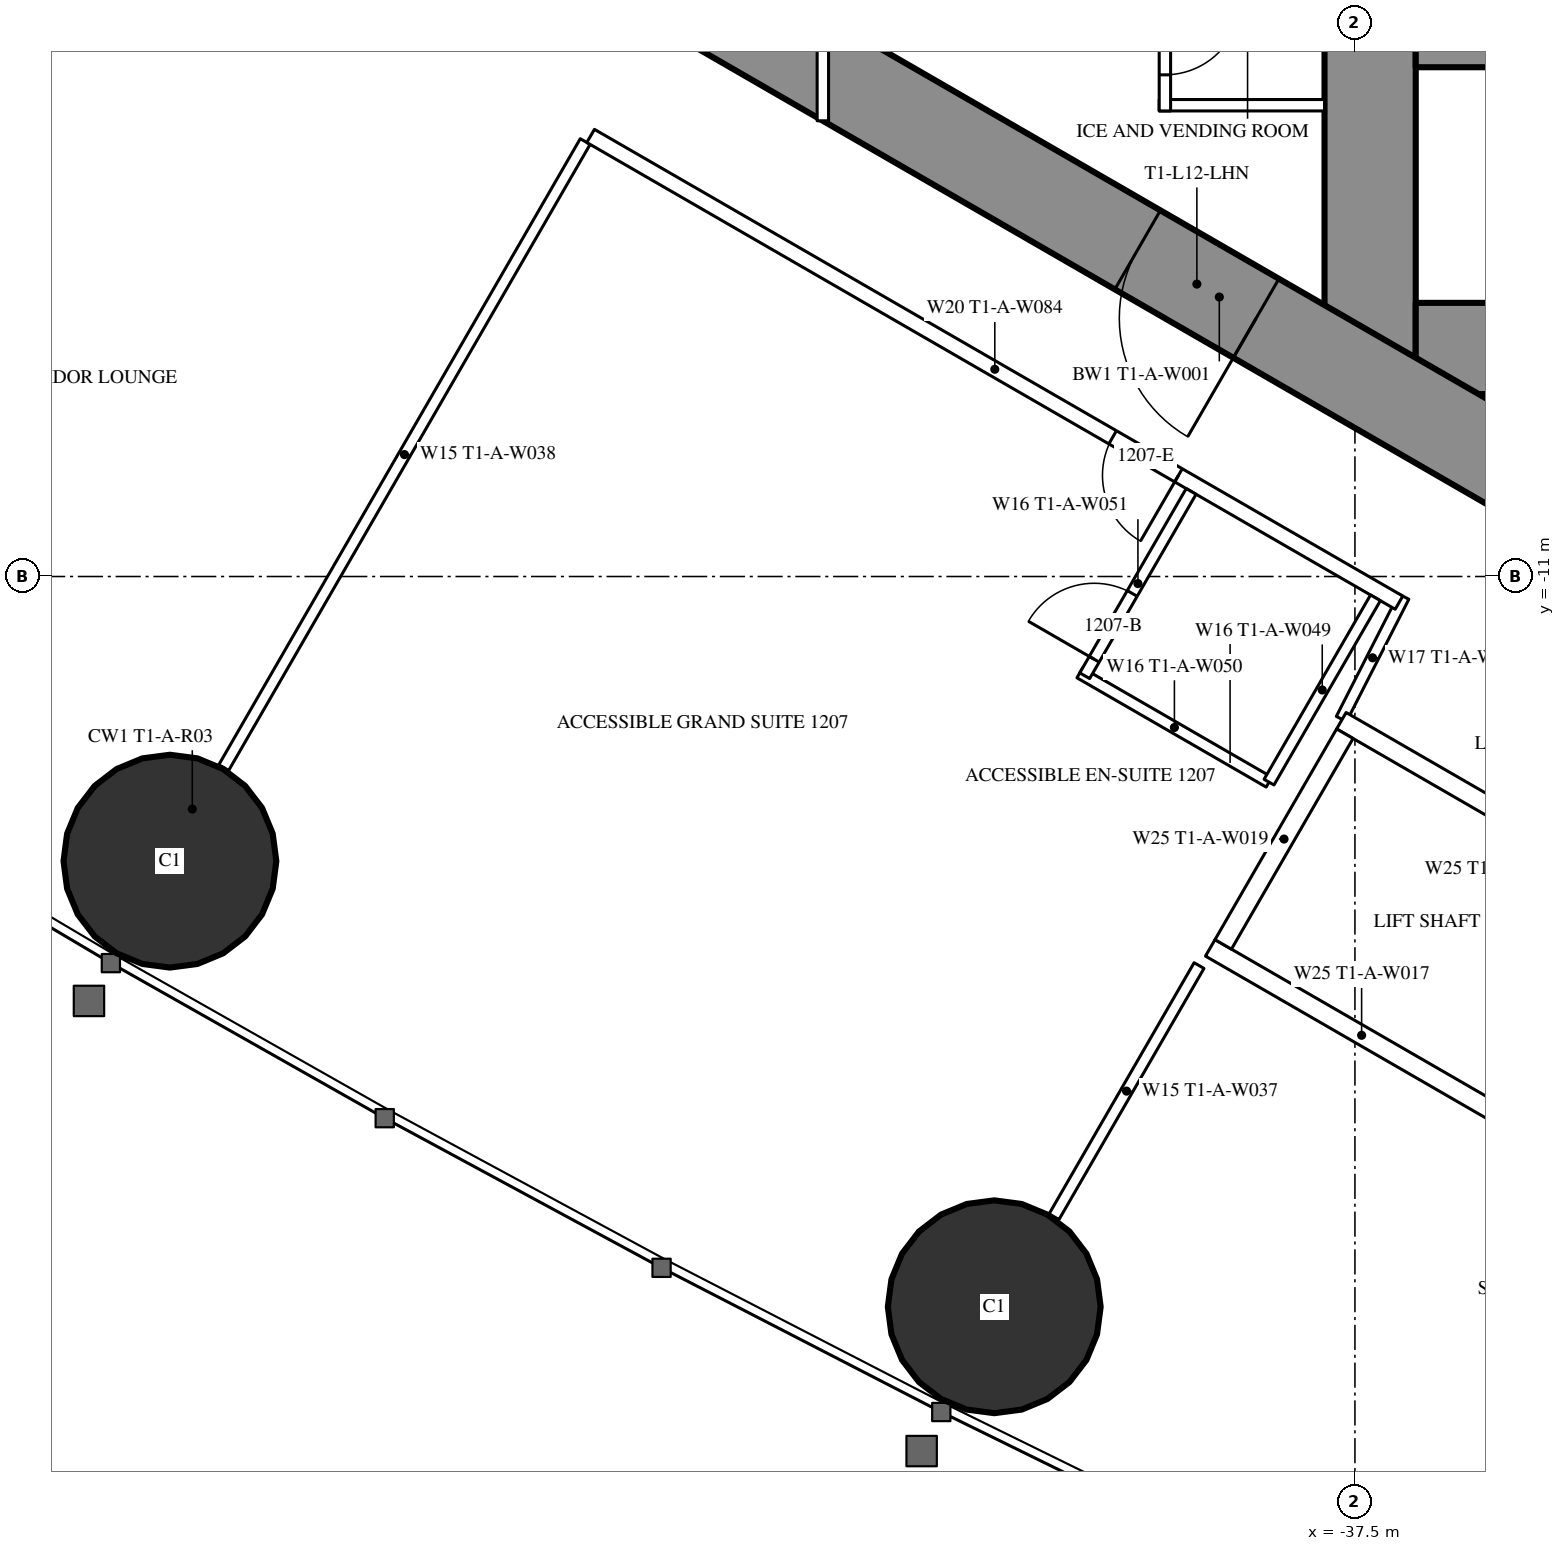
"""IFC4 building model, lengths in metres.
Left out: names, types, materials, properties, quantities, classifications, styles, units other than length and angle.
Written with IfcOpenShell. Run it as: python <this file> out.ifc"""

import sys

from ifc_helpers import new_model, si_unit, direction, frame, frame_2d, origin, origin_2d, place, context, subcontext, project, spatial, rectangle, hollow_circle, extrude, element, fill, save


model = new_model("IFC4")
c1 = context("Model", 3, precision=1e-05, world=origin(), true_north=direction((0.0, 1.0)))
c2 = subcontext(c1, "Body", "Model", "MODEL_VIEW")
j1 = project(units=[si_unit("LENGTHUNIT", "METRE"), si_unit("PLANEANGLEUNIT", "RADIAN")], contexts=[c1])
p1 = place(None, origin())
s1 = spatial("IfcSite", under=j1, at=p1, CompositionType="ELEMENT")
p2 = place(p1, origin())
s2 = spatial("IfcBuilding", under=s1, at=p2, CompositionType="ELEMENT")
p3 = place(p2, frame((0.0, 0.0, 49.5)))
s3 = spatial("IfcBuildingStorey", under=s2, at=p3, CompositionType="ELEMENT", Elevation=49.5)
for number, where, z_axis, x_axis in (
    (1, (-53.09, -14.745, 0.0), (0.0, 0.0, 1.0), (1.0, 0.0, 0.0)),
    (2, (-42.245, -20.607, 0.0), (0.0, 0.0, 1.0), (1.0, 0.0, 0.0)),
):
    element("IfcColumn", number, at=place(p3, frame(where, z_axis=z_axis, x_axis=x_axis)), inside=s3, PredefinedType="COLUMN", context=c2, shape_type="SweptSolid", body=[
        extrude(hollow_circle(Radius=1.4, WallThickness=0.12, at=origin_2d()), origin(), (0.0, 0.0, 1.0), 3.5),
    ])
p4 = place(p3, frame((-37.3, 8.6, 0.0), z_axis=(0.0, 0.0, 1.0), x_axis=(0.0, -1.0, 0.0)))
e3 = element("IfcWall", 3, at=p4, inside=s3, PredefinedType="SHEAR", context=c2, shape_type="SweptSolid", body=[
    extrude(rectangle(XDim=17.2, YDim=1.2, at=frame_2d((8.6, 0.0))), origin(), (0.0, 0.0, 1.0), 3.5),
])
p5 = place(p4, frame((7.7, 0.0, 0.0)))
e4 = element("IfcOpeningElement", 4, at=p5, cuts=e3, PredefinedType="OPENING", context=c2, shape_type="SweptSolid", body=[
    extrude(rectangle(XDim=1.8, YDim=2.2, at=frame_2d((0.9, 1.1))), frame((0.0, 0.61, 0.0), z_axis=(0.0, -1.0, 0.0), x_axis=(1.0, 0.0, 0.0)), (0.0, 0.0, 1.0), 1.22),
])
p6 = place(p3, frame((-28.3, -8.0, 0.0), z_axis=(0.0, 0.0, 1.0), x_axis=(-1.0, 0.0, 0.0)))
e5 = element("IfcWall", 5, at=p6, inside=s3, PredefinedType="SHEAR", context=c2, shape_type="SweptSolid", body=[
    extrude(rectangle(XDim=8.4, YDim=1.2, at=frame_2d((4.2, 0.0))), origin(), (0.0, 0.0, 1.0), 3.5),
])
p7 = place(p6, frame((0.25, 0.0, 0.0)))
e6 = element("IfcOpeningElement", 6, at=p7, cuts=e5, PredefinedType="OPENING", context=c2, shape_type="SweptSolid", body=[
    extrude(rectangle(XDim=1.0, YDim=2.2, at=frame_2d((0.5, 1.1))), frame((0.0, 0.61, 0.0), z_axis=(0.0, -1.0, 0.0), x_axis=(1.0, 0.0, 0.0)), (0.0, 0.0, 1.0), 1.22),
])
p8 = place(p3, frame((-28.3, -4.15, 0.0), z_axis=(0.0, 0.0, 1.0), x_axis=(-1.0, 0.0, 0.0)))
e7 = element("IfcWall", 7, at=p8, inside=s3, PredefinedType="SHEAR", context=c2, shape_type="SweptSolid", body=[
    extrude(rectangle(XDim=8.4, YDim=0.3, at=frame_2d((4.2, 0.0))), origin(), (0.0, 0.0, 1.0), 3.5),
])
p9 = place(p3, frame((-27.2, -14.3, 0.0), z_axis=(0.0, 0.0, 1.0), x_axis=(-0.866024021859, 0.500002393557, 0.0)))
e8 = element("IfcWall", 8, at=p9, inside=s3, PredefinedType="SHEAR", context=c2, shape_type="SweptSolid", body=[
    extrude(rectangle(XDim=27.907, YDim=1.2, at=frame_2d((13.954, 0.0))), origin(), (0.0, 0.0, 1.0), 3.5),
])
p10 = place(p9, frame((4.6, 0.0, 0.0)))
e9 = element("IfcOpeningElement", 9, at=p10, cuts=e8, PredefinedType="OPENING", context=c2, shape_type="SweptSolid", body=[
    extrude(rectangle(XDim=1.0, YDim=2.2, at=frame_2d((0.5, 1.1))), frame((0.0, 0.61, 0.0), z_axis=(0.0, -1.0, 0.0), x_axis=(1.0, 0.0, 0.0)), (0.0, 0.0, 1.0), 1.22),
])
p11 = place(p9, frame((13.395, 0.0, 0.0)))
e10 = element("IfcOpeningElement", 10, at=p11, cuts=e8, PredefinedType="OPENING", context=c2, shape_type="SweptSolid", body=[
    extrude(rectangle(XDim=1.8, YDim=2.2, at=frame_2d((0.9, 1.1))), frame((0.0, 0.61, 0.0), z_axis=(0.0, -1.0, 0.0), x_axis=(1.0, 0.0, 0.0)), (0.0, 0.0, 1.0), 1.22),
])
p12 = place(p3, frame((-47.627, -5.278, 0.0), z_axis=(0.0, 0.0, 1.0), x_axis=(-0.500009844318, -0.86601972009, 0.0)))
e11 = element("IfcWall", 11, at=p12, inside=s3, PredefinedType="PARTITIONING", context=c2, shape_type="SweptSolid", body=[
    extrude(rectangle(XDim=9.51, YDim=0.15, at=frame_2d((4.755, 0.0))), origin(), (0.0, 0.0, 1.0), 2.25),
])
p13 = place(p3, frame((-39.551, -16.118, 0.0), z_axis=(0.0, 0.0, 1.0), x_axis=(-0.499986503906, -0.866033195618, 0.0)))
e12 = element("IfcWall", 12, at=p13, inside=s3, PredefinedType="PARTITIONING", context=c2, shape_type="SweptSolid", body=[
    extrude(rectangle(XDim=3.815, YDim=0.15, at=frame_2d((1.907, 0.0))), origin(), (0.0, 0.0, 1.0), 3.25),
])
p14 = place(p3, frame((-36.857, -11.265, 0.0), z_axis=(0.0, 0.0, 1.0), x_axis=(-0.454225294761, -0.890886851176, 0.0)))
e13 = element("IfcWall", 13, at=p14, inside=s3, PredefinedType="PARTITIONING", context=c2, shape_type="SweptSolid", body=[
    extrude(rectangle(XDim=1.807, YDim=0.15, at=frame_2d((0.904, 0.0))), origin(), (0.0, 0.0, 1.0), 3.25),
])
p15 = place(p3, frame((-36.92, -11.344, 0.0), z_axis=(0.0, 0.0, 1.0), x_axis=(-0.866025017052, 0.500000669839, 0.0)))
e14 = element("IfcWall", 14, at=p15, inside=s3, PredefinedType="PARTITIONING", context=c2, shape_type="SweptSolid", body=[
    extrude(rectangle(XDim=12.28, YDim=0.2, at=frame_2d((6.14, 0.0))), origin(), (0.0, 0.0, 1.0), 3.25),
])
p16 = place(p15, frame((3.35, 0.0, 0.0)))
e15 = element("IfcOpeningElement", 15, at=p16, cuts=e14, PredefinedType="OPENING", context=c2, shape_type="SweptSolid", body=[
    extrude(rectangle(XDim=1.0, YDim=2.2, at=frame_2d((0.5, 1.1))), frame((0.0, 0.11, 0.0), z_axis=(0.0, -1.0, 0.0), x_axis=(1.0, 0.0, 0.0)), (0.0, 0.0, 1.0), 0.22),
])
p17 = place(p3, frame((-38.63, -13.705, 0.0), z_axis=(0.0, 0.0, 1.0), x_axis=(-0.866018712932, 0.500011588718, 0.0)))
e16 = element("IfcWall", 16, at=p17, inside=s3, PredefinedType="PARTITIONING", context=c2, shape_type="SweptSolid", body=[
    extrude(rectangle(XDim=2.875, YDim=0.15, at=frame_2d((1.438, 0.0))), origin(), (0.0, 0.0, 1.0), 3.25),
])
p18 = place(p3, frame((-39.655, -9.88, 0.0), z_axis=(0.0, 0.0, 1.0), x_axis=(-0.500049511043, -0.865996816683, 0.0)))
e17 = element("IfcWall", 17, at=p18, inside=s3, PredefinedType="PARTITIONING", context=c2, shape_type="SweptSolid", body=[
    extrude(rectangle(XDim=2.8, YDim=0.15, at=frame_2d((1.4, 0.0))), origin(), (0.0, 0.0, 1.0), 3.25),
])
p19 = place(p18, frame((1.55, 0.0, 0.0)))
e18 = element("IfcOpeningElement", 18, at=p19, cuts=e17, PredefinedType="OPENING", context=c2, shape_type="SweptSolid", body=[
    extrude(rectangle(XDim=1.0, YDim=2.2, at=frame_2d((0.5, 1.1))), frame((0.0, 0.085, 0.0), z_axis=(0.0, -1.0, 0.0), x_axis=(1.0, 0.0, 0.0)), (0.0, 0.0, 1.0), 0.17),
])
p20 = place(p3, frame((-37.23, -11.281, 0.0), z_axis=(0.0, 0.0, 1.0), x_axis=(-0.500049511043, -0.865996816683, 0.0)))
e19 = element("IfcWall", 19, at=p20, inside=s3, PredefinedType="PARTITIONING", context=c2, shape_type="SweptSolid", body=[
    extrude(rectangle(XDim=2.8, YDim=0.15, at=frame_2d((1.4, 0.0))), origin(), (0.0, 0.0, 1.0), 3.25),
])
p21 = place(p3, frame((-37.9, -4.8, 0.0), z_axis=(0.0, 0.0, 1.0), x_axis=(-1.0, 0.0, 0.0)))
e20 = element("IfcWall", 20, at=p21, inside=s3, PredefinedType="PARTITIONING", context=c2, shape_type="SweptSolid", body=[
    extrude(rectangle(XDim=2.175, YDim=0.15, at=frame_2d((1.087, 0.0))), origin(), (0.0, 0.0, 1.0), 3.25),
])
p22 = place(p3, frame((-40.0, -2.925, 0.0), z_axis=(0.0, 0.0, 1.0), x_axis=(0.0, -1.0, 0.0)))
e21 = element("IfcWall", 21, at=p22, inside=s3, PredefinedType="PARTITIONING", context=c2, shape_type="SweptSolid", body=[
    extrude(rectangle(XDim=1.95, YDim=0.15, at=frame_2d((0.975, 0.0))), origin(), (0.0, 0.0, 1.0), 3.25),
])
p23 = place(p22, frame((0.475, 0.0, 0.0)))
e22 = element("IfcOpeningElement", 22, at=p23, cuts=e21, PredefinedType="OPENING", context=c2, shape_type="SweptSolid", body=[
    extrude(rectangle(XDim=1.0, YDim=2.2, at=frame_2d((0.5, 1.1))), frame((0.0, 0.085, 0.0), z_axis=(0.0, -1.0, 0.0), x_axis=(1.0, 0.0, 0.0)), (0.0, 0.0, 1.0), 0.17),
])
p24 = place(p3, frame((-44.5, 5.005, 0.0), z_axis=(0.0, 0.0, 1.0), x_axis=(0.0, -1.0, 0.0)))
e23 = element("IfcWall", 23, at=p24, inside=s3, PredefinedType="PARTITIONING", context=c2, shape_type="SweptSolid", body=[
    extrude(rectangle(XDim=10.009, YDim=0.15, at=frame_2d((5.005, 0.0))), origin(), (0.0, 0.0, 1.0), 2.45),
])
p25 = place(p24, frame((2.002, 0.0, 0.0)))
e24 = element("IfcOpeningElement", 24, at=p25, cuts=e23, PredefinedType="OPENING", context=c2, shape_type="SweptSolid", body=[
    extrude(rectangle(XDim=1.0, YDim=2.2, at=frame_2d((0.5, 1.1))), frame((0.0, 0.085, 0.0), z_axis=(0.0, -1.0, 0.0), x_axis=(1.0, 0.0, 0.0)), (0.0, 0.0, 1.0), 0.17),
])
p26 = place(p24, frame((7.007, 0.0, 0.0)))
e25 = element("IfcOpeningElement", 25, at=p26, cuts=e23, PredefinedType="OPENING", context=c2, shape_type="SweptSolid", body=[
    extrude(rectangle(XDim=1.0, YDim=2.2, at=frame_2d((0.5, 1.1))), frame((0.0, 0.085, 0.0), z_axis=(0.0, -1.0, 0.0), x_axis=(1.0, 0.0, 0.0)), (0.0, 0.0, 1.0), 0.17),
])
p27 = place(p3, frame((-33.696, -15.197, 0.0), z_axis=(0.0, 0.0, 1.0), x_axis=(-0.865976953817, 0.500083908417, 0.0)))
e26 = element("IfcWall", 26, at=p27, inside=s3, PredefinedType="PARTITIONING", context=c2, shape_type="SweptSolid", body=[
    extrude(rectangle(XDim=4.599, YDim=0.25, at=frame_2d((2.3, 0.0))), origin(), (0.0, 0.0, 1.0), 3.25),
])
p28 = place(p3, frame((-35.42, -18.186, 0.0), z_axis=(0.0, 0.0, 1.0), x_axis=(-0.865990227814, 0.50006092162, 0.0)))
e27 = element("IfcWall", 27, at=p28, inside=s3, PredefinedType="PARTITIONING", context=c2, shape_type="SweptSolid", body=[
    extrude(rectangle(XDim=4.6, YDim=0.25, at=frame_2d((2.3, 0.0))), origin(), (0.0, 0.0, 1.0), 3.25),
])
p29 = place(p3, frame((-37.633, -13.068, 0.0), z_axis=(0.0, 0.0, 1.0), x_axis=(-0.499872130319, -0.866099216793, 0.0)))
e28 = element("IfcWall", 28, at=p29, inside=s3, PredefinedType="PARTITIONING", context=c2, shape_type="SweptSolid", body=[
    extrude(rectangle(XDim=3.2, YDim=0.25, at=frame_2d((1.6, 0.0))), origin(), (0.0, 0.0, 1.0), 3.25),
])
p30 = place(p19, origin())
e29 = element("IfcDoor", 29, at=p30, inside=s3, OperationType="SINGLE_SWING_RIGHT", PredefinedType="DOOR", context=c2, shape_type="SweptSolid", body=[
    extrude(rectangle(XDim=1.0, YDim=2.2, at=frame_2d((0.5, 1.1))), frame((0.0, 0.025, 0.0), z_axis=(0.0, -1.0, 0.0), x_axis=(1.0, 0.0, 0.0)), (0.0, 0.0, 1.0), 0.05),
])
fill(e18, e29)
p31 = place(p16, origin())
e30 = element("IfcDoor", 30, at=p31, inside=s3, OperationType="SINGLE_SWING_LEFT", PredefinedType="DOOR", context=c2, shape_type="SweptSolid", body=[
    extrude(rectangle(XDim=1.0, YDim=2.2, at=frame_2d((0.5, 1.1))), frame((0.0, 0.025, 0.0), z_axis=(0.0, -1.0, 0.0), x_axis=(1.0, 0.0, 0.0)), (0.0, 0.0, 1.0), 0.05),
])
fill(e15, e30)
p32 = place(p23, origin())
e31 = element("IfcDoor", 31, at=p32, inside=s3, OperationType="SINGLE_SWING_LEFT", PredefinedType="DOOR", context=c2, shape_type="SweptSolid", body=[
    extrude(rectangle(XDim=1.0, YDim=2.2, at=frame_2d((0.5, 1.1))), frame((0.0, 0.025, 0.0), z_axis=(0.0, -1.0, 0.0), x_axis=(1.0, 0.0, 0.0)), (0.0, 0.0, 1.0), 0.05),
])
fill(e22, e31)
p33 = place(p11, origin())
e32 = element("IfcDoor", 32, at=p33, inside=s3, OperationType="DOUBLE_DOOR_SINGLE_SWING", PredefinedType="DOOR", context=c2, shape_type="SweptSolid", body=[
    extrude(rectangle(XDim=1.8, YDim=2.2, at=frame_2d((0.9, 1.1))), frame((0.0, 0.025, 0.0), z_axis=(0.0, -1.0, 0.0), x_axis=(1.0, 0.0, 0.0)), (0.0, 0.0, 1.0), 0.05),
])
fill(e10, e32)
save(model, sys.argv[1])
